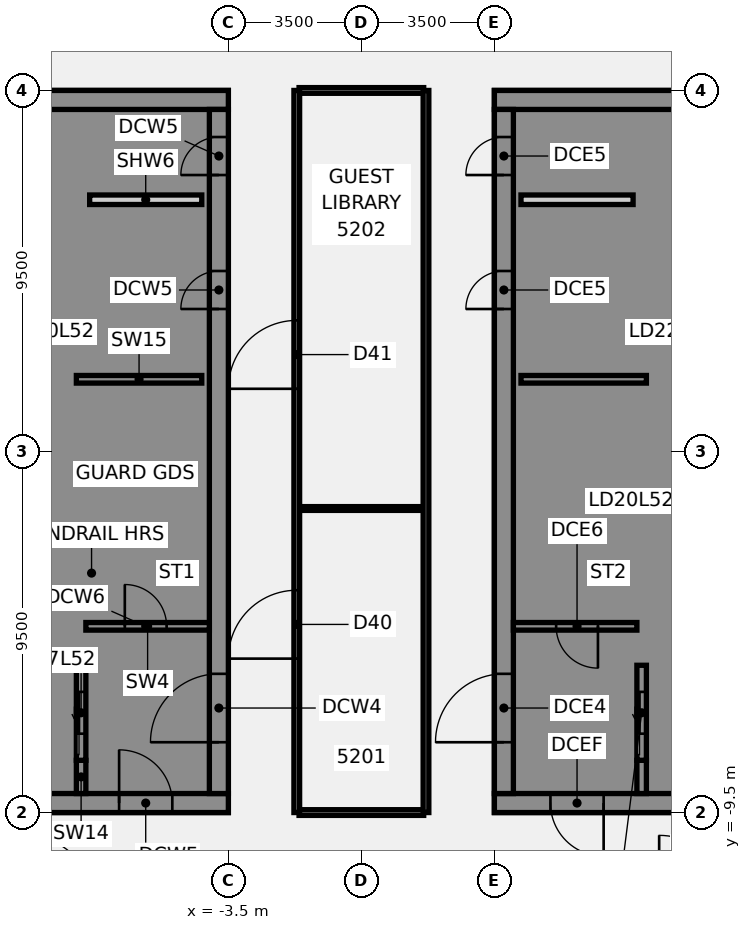
"""IFC4 building model, lengths in metres.
Left out: names, types, materials, properties, quantities, classifications, styles, units other than length and angle.
Written with IfcOpenShell. Run it as: python <this file> out.ifc"""

import sys

from ifc_helpers import new_model, si_unit, direction, frame, frame_2d, origin, place, context, subcontext, project, spatial, polyline, rectangle, outline, extrude, element, fill, save


model = new_model("IFC4")
c1 = context("Model", 3, precision=1e-05, world=origin(), true_north=direction((0.0, 1.0)))
c2 = subcontext(c1, "Body", "Model", "MODEL_VIEW")
j1 = project(units=[si_unit("LENGTHUNIT", "METRE"), si_unit("PLANEANGLEUNIT", "RADIAN")], contexts=[c1])
p1 = place(None, origin())
s1 = spatial("IfcSite", under=j1, at=p1, CompositionType="ELEMENT")
p2 = place(p1, origin())
s2 = spatial("IfcBuilding", under=s1, at=p2, CompositionType="ELEMENT")
p3 = place(p2, frame((0.0, 0.0, 207.7)))
s3 = spatial("IfcBuildingStorey", under=s2, at=p3, CompositionType="ELEMENT", Elevation=207.7)
p4 = place(p3, frame((-1.64, -9.5, 0.0), z_axis=(0.0, 0.0, 1.0), x_axis=(1.0, 0.0, 0.0)))
e1 = element("IfcWall", 1, at=p4, inside=s3, PredefinedType="PARTITIONING", context=c2, shape_type="SweptSolid", body=[
    extrude(rectangle(XDim=3.28, YDim=0.15, at=frame_2d((1.64, 0.0))), origin(), (0.0, 0.0, 1.0), 2.864),
])
p5 = place(p3, frame((-1.64, -1.5, 0.0), z_axis=(0.0, 0.0, 1.0), x_axis=(1.0, 0.0, 0.0)))
e2 = element("IfcWall", 2, at=p5, inside=s3, PredefinedType="PARTITIONING", context=c2, shape_type="SweptSolid", body=[
    extrude(rectangle(XDim=3.28, YDim=0.1, at=frame_2d((1.64, 0.0))), origin(), (0.0, 0.0, 1.0), 2.864),
])
p6 = place(p3, frame((-1.64, 9.5, 0.0), z_axis=(0.0, 0.0, 1.0), x_axis=(1.0, 0.0, 0.0)))
e3 = element("IfcWall", 3, at=p6, inside=s3, PredefinedType="PARTITIONING", context=c2, shape_type="SweptSolid", body=[
    extrude(rectangle(XDim=3.28, YDim=0.15, at=frame_2d((1.64, 0.0))), origin(), (0.0, 0.0, 1.0), 2.864),
])
p7 = place(p3, frame((-1.7, -9.5, 0.0), z_axis=(0.0, 0.0, 1.0), x_axis=(0.0, 1.0, 0.0)))
e4 = element("IfcWall", 4, at=p7, inside=s3, PredefinedType="PARTITIONING", context=c2, shape_type="SweptSolid", body=[
    extrude(rectangle(XDim=19.0, YDim=0.15, at=frame_2d((9.5, 0.0))), origin(), (0.0, 0.0, 1.0), 2.864),
])
p8 = place(p7, frame((4.05, 0.0, 0.0)))
e5 = element("IfcOpeningElement", 5, at=p8, cuts=e4, PredefinedType="OPENING", context=c2, shape_type="SweptSolid", body=[
    extrude(rectangle(XDim=1.8, YDim=2.1, at=frame_2d((0.9, 1.05))), frame((0.0, 0.085, 0.0), z_axis=(0.0, -1.0, 0.0), x_axis=(1.0, 0.0, 0.0)), (0.0, 0.0, 1.0), 0.17),
])
p9 = place(p7, frame((11.15, 0.0, 0.0)))
e6 = element("IfcOpeningElement", 6, at=p9, cuts=e4, PredefinedType="OPENING", context=c2, shape_type="SweptSolid", body=[
    extrude(rectangle(XDim=1.8, YDim=2.1, at=frame_2d((0.9, 1.05))), frame((0.0, 0.085, 0.0), z_axis=(0.0, -1.0, 0.0), x_axis=(1.0, 0.0, 0.0)), (0.0, 0.0, 1.0), 0.17),
])
p10 = place(p3, frame((1.7, -9.5, 0.0), z_axis=(0.0, 0.0, 1.0), x_axis=(0.0, 1.0, 0.0)))
e7 = element("IfcWall", 7, at=p10, inside=s3, PredefinedType="PARTITIONING", context=c2, shape_type="SweptSolid", body=[
    extrude(rectangle(XDim=19.0, YDim=0.15, at=frame_2d((9.5, 0.0))), origin(), (0.0, 0.0, 1.0), 2.864),
])
p11 = place(p3, frame((-16.5, -9.25, 0.0), z_axis=(0.0, 0.0, 1.0), x_axis=(1.0, 0.0, 0.0)))
e8 = element("IfcWall", 8, at=p11, inside=s3, PredefinedType="SHEAR", context=c2, shape_type="SweptSolid", body=[
    extrude(rectangle(XDim=13.0, YDim=0.5, at=frame_2d((6.5, 0.0))), origin(), (0.0, 0.0, 1.0), 3.46),
])
p12 = place(p11, frame((4.15, 0.0, 0.0)))
e9 = element("IfcOpeningElement", 9, at=p12, cuts=e8, PredefinedType="OPENING", context=c2, shape_type="SweptSolid", body=[
    extrude(rectangle(XDim=1.4, YDim=2.1, at=frame_2d((0.7, 1.05))), frame((0.0, 0.26, 0.0), z_axis=(0.0, -1.0, 0.0), x_axis=(1.0, 0.0, 0.0)), (0.0, 0.0, 1.0), 0.52),
])
p13 = place(p11, frame((10.125, 0.0, 0.0)))
e10 = element("IfcOpeningElement", 10, at=p13, cuts=e8, PredefinedType="OPENING", context=c2, shape_type="SweptSolid", body=[
    extrude(rectangle(XDim=1.4, YDim=2.1, at=frame_2d((0.7, 1.05))), frame((0.0, 0.26, 0.0), z_axis=(0.0, -1.0, 0.0), x_axis=(1.0, 0.0, 0.0)), (0.0, 0.0, 1.0), 0.52),
])
p14 = place(p3, frame((-16.5, 9.25, 0.0), z_axis=(0.0, 0.0, 1.0), x_axis=(1.0, 0.0, 0.0)))
e11 = element("IfcWall", 11, at=p14, inside=s3, PredefinedType="SHEAR", context=c2, shape_type="SweptSolid", body=[
    extrude(rectangle(XDim=13.0, YDim=0.5, at=frame_2d((6.5, 0.0))), origin(), (0.0, 0.0, 1.0), 3.46),
])
p15 = place(p3, origin())
e12 = element("IfcWall", 12, at=p15, inside=s3, PredefinedType="SHEAR", context=c2, shape_type="SweptSolid", body=[
    extrude(outline(polyline([(-9.8, -5.375), (-9.8, -5.625), (-7.5, -5.625), (-7.25, -5.625), (-7.25, 9.0), (-7.5, 9.0), (-9.8, 9.0), (-9.8, 8.125), (-7.5, 8.125), (-7.5, 5.625), (-9.8, 5.625), (-9.8, 5.375), (-7.5, 5.375), (-7.5, 2.875), (-9.8, 2.875), (-9.8, 2.625), (-7.5, 2.625), (-7.5, 0.125), (-9.8, 0.125), (-9.8, -0.125), (-7.5, -0.125), (-7.5, -2.625), (-9.8, -2.625), (-9.8, -2.875), (-7.5, -2.875), (-7.5, -5.375), (-9.8, -5.375)])), origin(), (0.0, 0.0, 1.0), 3.46),
])
p16 = place(p3, origin())
e13 = element("IfcWall", 13, at=p16, inside=s3, PredefinedType="SHEAR", context=c2, shape_type="SweptSolid", body=[
    extrude(outline(polyline([(-7.5, -8.125), (-9.55, -8.125), (-9.55, -5.625), (-9.8, -5.625), (-9.8, -8.125), (-9.8, -9.0), (-7.5, -9.0), (-7.5, -8.125)])), origin(), (0.0, 0.0, 1.0), 3.46),
])
p17 = place(p3, frame((-7.375, -9.0, 0.0), z_axis=(0.0, 0.0, 1.0), x_axis=(0.0, 1.0, 0.0)))
e14 = element("IfcWall", 14, at=p17, inside=s3, PredefinedType="SHEAR", context=c2, shape_type="SweptSolid", body=[
    extrude(rectangle(XDim=0.875, YDim=0.25, at=frame_2d((0.438, 0.0))), origin(), (0.0, 0.0, 1.0), 3.46),
])
p18 = place(p3, frame((-7.5, 1.9, 0.0), z_axis=(0.0, 0.0, 1.0), x_axis=(1.0, 0.0, 0.0)))
e15 = element("IfcWall", 15, at=p18, inside=s3, PredefinedType="SHEAR", context=c2, shape_type="SweptSolid", body=[
    extrude(rectangle(XDim=3.3, YDim=0.2, at=frame_2d((1.65, 0.0))), origin(), (0.0, 0.0, 1.0), 3.46),
])
p19 = place(p3, frame((-7.375, -8.125, 0.0), z_axis=(0.0, 0.0, 1.0), x_axis=(0.0, 1.0, 0.0)))
e16 = element("IfcWall", 16, at=p19, inside=s3, PredefinedType="SHEAR", context=c2, shape_type="SweptSolid", body=[
    extrude(rectangle(XDim=2.5, YDim=0.25, at=frame_2d((1.25, 0.0))), origin(), (0.0, 0.0, 1.0), 3.46),
])
p20 = place(p19, frame((0.7, 0.0, 0.0)))
e17 = element("IfcOpeningElement", 17, at=p20, cuts=e16, PredefinedType="OPENING", context=c2, shape_type="SweptSolid", body=[
    extrude(rectangle(XDim=1.1, YDim=2.1, at=frame_2d((0.55, 1.05))), frame((0.0, 0.135, 0.0), z_axis=(0.0, -1.0, 0.0), x_axis=(1.0, 0.0, 0.0)), (0.0, 0.0, 1.0), 0.27),
])
p21 = place(p3, frame((-3.75, -9.0, 0.0), z_axis=(0.0, 0.0, 1.0), x_axis=(0.0, 1.0, 0.0)))
e18 = element("IfcWall", 18, at=p21, inside=s3, PredefinedType="SHEAR", context=c2, shape_type="SweptSolid", body=[
    extrude(rectangle(XDim=18.0, YDim=0.5, at=frame_2d((9.0, 0.0))), origin(), (0.0, 0.0, 1.0), 3.46),
])
p22 = place(p21, frame((1.35, 0.0, 0.0)))
e19 = element("IfcOpeningElement", 19, at=p22, cuts=e18, PredefinedType="OPENING", context=c2, shape_type="SweptSolid", body=[
    extrude(rectangle(XDim=1.8, YDim=2.1, at=frame_2d((0.9, 1.05))), frame((0.0, 0.26, 0.0), z_axis=(0.0, -1.0, 0.0), x_axis=(1.0, 0.0, 0.0)), (0.0, 0.0, 1.0), 0.52),
])
p23 = place(p21, frame((12.75, 0.0, 0.0)))
e20 = element("IfcOpeningElement", 20, at=p23, cuts=e18, PredefinedType="OPENING", context=c2, shape_type="SweptSolid", body=[
    extrude(rectangle(XDim=1.0, YDim=2.1, at=frame_2d((0.5, 1.05))), frame((0.0, 0.26, 0.0), z_axis=(0.0, -1.0, 0.0), x_axis=(1.0, 0.0, 0.0)), (0.0, 0.0, 1.0), 0.52),
])
p24 = place(p21, frame((16.274, 0.0, 0.0)))
e21 = element("IfcOpeningElement", 21, at=p24, cuts=e18, PredefinedType="OPENING", context=c2, shape_type="SweptSolid", body=[
    extrude(rectangle(XDim=1.0, YDim=2.1, at=frame_2d((0.5, 1.05))), frame((0.0, 0.26, 0.0), z_axis=(0.0, -1.0, 0.0), x_axis=(1.0, 0.0, 0.0)), (0.0, 0.0, 1.0), 0.52),
])
p25 = place(p3, frame((-7.15, 6.624, 0.0), z_axis=(0.0, 0.0, 1.0), x_axis=(1.0, 0.0, 0.0)))
e22 = element("IfcWall", 22, at=p25, inside=s3, PredefinedType="PARTITIONING", context=c2, shape_type="SweptSolid", body=[
    extrude(rectangle(XDim=2.95, YDim=0.25, at=frame_2d((1.475, 0.0))), origin(), (0.0, 0.0, 1.0), 3.46),
])
p26 = place(p3, frame((-7.25, -4.6, 0.0), z_axis=(0.0, 0.0, 1.0), x_axis=(1.0, 0.0, 0.0)))
e23 = element("IfcWall", 23, at=p26, inside=s3, PredefinedType="SHEAR", context=c2, shape_type="SweptSolid", body=[
    extrude(rectangle(XDim=3.25, YDim=0.2, at=frame_2d((1.625, 0.0))), origin(), (0.0, 0.0, 1.0), 3.46),
])
p27 = place(p26, frame((1.025, 0.0, 0.0)))
e24 = element("IfcOpeningElement", 24, at=p27, cuts=e23, PredefinedType="OPENING", context=c2, shape_type="SweptSolid", body=[
    extrude(rectangle(XDim=1.1, YDim=2.1, at=frame_2d((0.55, 1.05))), frame((0.0, 0.11, 0.0), z_axis=(0.0, -1.0, 0.0), x_axis=(1.0, 0.0, 0.0)), (0.0, 0.0, 1.0), 0.22),
])
p28 = place(p3, frame((16.5, -9.25, 0.0), z_axis=(0.0, 0.0, 1.0), x_axis=(-1.0, 0.0, 0.0)))
e25 = element("IfcWall", 25, at=p28, inside=s3, PredefinedType="SHEAR", context=c2, shape_type="SweptSolid", body=[
    extrude(rectangle(XDim=13.0, YDim=0.5, at=frame_2d((6.5, 0.0))), origin(), (0.0, 0.0, 1.0), 3.46),
])
p29 = place(p28, frame((4.15, 0.0, 0.0)))
e26 = element("IfcOpeningElement", 26, at=p29, cuts=e25, PredefinedType="OPENING", context=c2, shape_type="SweptSolid", body=[
    extrude(rectangle(XDim=1.4, YDim=2.1, at=frame_2d((0.7, 1.05))), frame((0.0, 0.26, 0.0), z_axis=(0.0, -1.0, 0.0), x_axis=(1.0, 0.0, 0.0)), (0.0, 0.0, 1.0), 0.52),
])
p30 = place(p28, frame((10.125, 0.0, 0.0)))
e27 = element("IfcOpeningElement", 27, at=p30, cuts=e25, PredefinedType="OPENING", context=c2, shape_type="SweptSolid", body=[
    extrude(rectangle(XDim=1.4, YDim=2.1, at=frame_2d((0.7, 1.05))), frame((0.0, 0.26, 0.0), z_axis=(0.0, -1.0, 0.0), x_axis=(1.0, 0.0, 0.0)), (0.0, 0.0, 1.0), 0.52),
])
p31 = place(p3, frame((16.5, 9.25, 0.0), z_axis=(0.0, 0.0, 1.0), x_axis=(-1.0, 0.0, 0.0)))
e28 = element("IfcWall", 28, at=p31, inside=s3, PredefinedType="SHEAR", context=c2, shape_type="SweptSolid", body=[
    extrude(rectangle(XDim=13.0, YDim=0.5, at=frame_2d((6.5, 0.0))), origin(), (0.0, 0.0, 1.0), 3.46),
])
p32 = place(p3, origin())
e29 = element("IfcWall", 29, at=p32, inside=s3, PredefinedType="SHEAR", context=c2, shape_type="SweptSolid", body=[
    extrude(outline(polyline([(9.8, -5.375), (7.5, -5.375), (7.5, -2.875), (9.8, -2.875), (9.8, -2.625), (7.5, -2.625), (7.5, -0.125), (9.8, -0.125), (9.8, 0.125), (7.5, 0.125), (7.5, 2.625), (9.8, 2.625), (9.8, 2.875), (7.5, 2.875), (7.5, 5.375), (9.8, 5.375), (9.8, 5.625), (7.5, 5.625), (7.5, 8.125), (9.8, 8.125), (9.8, 9.0), (7.5, 9.0), (7.25, 9.0), (7.25, -5.625), (7.5, -5.625), (9.8, -5.625), (9.8, -5.375)])), origin(), (0.0, 0.0, 1.0), 3.46),
])
p33 = place(p3, origin())
e30 = element("IfcWall", 30, at=p33, inside=s3, PredefinedType="SHEAR", context=c2, shape_type="SweptSolid", body=[
    extrude(outline(polyline([(7.5, -8.125), (7.5, -9.0), (9.8, -9.0), (9.8, -8.125), (9.8, -5.625), (9.55, -5.625), (9.55, -8.125), (7.5, -8.125)])), origin(), (0.0, 0.0, 1.0), 3.46),
])
p34 = place(p3, frame((7.375, -9.0, 0.0), z_axis=(0.0, 0.0, 1.0), x_axis=(0.0, 1.0, 0.0)))
e31 = element("IfcWall", 31, at=p34, inside=s3, PredefinedType="SHEAR", context=c2, shape_type="SweptSolid", body=[
    extrude(rectangle(XDim=0.875, YDim=0.25, at=frame_2d((0.438, 0.0))), origin(), (0.0, 0.0, 1.0), 3.46),
])
p35 = place(p3, frame((7.5, 1.9, 0.0), z_axis=(0.0, 0.0, 1.0), x_axis=(-1.0, 0.0, 0.0)))
e32 = element("IfcWall", 32, at=p35, inside=s3, PredefinedType="SHEAR", context=c2, shape_type="SweptSolid", body=[
    extrude(rectangle(XDim=3.3, YDim=0.2, at=frame_2d((1.65, 0.0))), origin(), (0.0, 0.0, 1.0), 3.46),
])
p36 = place(p3, frame((7.375, -8.125, 0.0), z_axis=(0.0, 0.0, 1.0), x_axis=(0.0, 1.0, 0.0)))
e33 = element("IfcWall", 33, at=p36, inside=s3, PredefinedType="SHEAR", context=c2, shape_type="SweptSolid", body=[
    extrude(rectangle(XDim=2.5, YDim=0.25, at=frame_2d((1.25, 0.0))), origin(), (0.0, 0.0, 1.0), 3.46),
])
p37 = place(p36, frame((0.7, 0.0, 0.0)))
e34 = element("IfcOpeningElement", 34, at=p37, cuts=e33, PredefinedType="OPENING", context=c2, shape_type="SweptSolid", body=[
    extrude(rectangle(XDim=1.1, YDim=2.1, at=frame_2d((0.55, 1.05))), frame((0.0, 0.135, 0.0), z_axis=(0.0, -1.0, 0.0), x_axis=(1.0, 0.0, 0.0)), (0.0, 0.0, 1.0), 0.27),
])
p38 = place(p3, frame((3.75, -9.0, 0.0), z_axis=(0.0, 0.0, 1.0), x_axis=(0.0, 1.0, 0.0)))
e35 = element("IfcWall", 35, at=p38, inside=s3, PredefinedType="SHEAR", context=c2, shape_type="SweptSolid", body=[
    extrude(rectangle(XDim=18.0, YDim=0.5, at=frame_2d((9.0, 0.0))), origin(), (0.0, 0.0, 1.0), 3.46),
])
p39 = place(p38, frame((1.35, 0.0, 0.0)))
e36 = element("IfcOpeningElement", 36, at=p39, cuts=e35, PredefinedType="OPENING", context=c2, shape_type="SweptSolid", body=[
    extrude(rectangle(XDim=1.8, YDim=2.1, at=frame_2d((0.9, 1.05))), frame((0.0, 0.26, 0.0), z_axis=(0.0, -1.0, 0.0), x_axis=(1.0, 0.0, 0.0)), (0.0, 0.0, 1.0), 0.52),
])
p40 = place(p38, frame((12.75, 0.0, 0.0)))
e37 = element("IfcOpeningElement", 37, at=p40, cuts=e35, PredefinedType="OPENING", context=c2, shape_type="SweptSolid", body=[
    extrude(rectangle(XDim=1.0, YDim=2.1, at=frame_2d((0.5, 1.05))), frame((0.0, 0.26, 0.0), z_axis=(0.0, -1.0, 0.0), x_axis=(1.0, 0.0, 0.0)), (0.0, 0.0, 1.0), 0.52),
])
p41 = place(p38, frame((16.274, 0.0, 0.0)))
e38 = element("IfcOpeningElement", 38, at=p41, cuts=e35, PredefinedType="OPENING", context=c2, shape_type="SweptSolid", body=[
    extrude(rectangle(XDim=1.0, YDim=2.1, at=frame_2d((0.5, 1.05))), frame((0.0, 0.26, 0.0), z_axis=(0.0, -1.0, 0.0), x_axis=(1.0, 0.0, 0.0)), (0.0, 0.0, 1.0), 0.52),
])
p42 = place(p3, frame((7.15, 6.624, 0.0), z_axis=(0.0, 0.0, 1.0), x_axis=(-1.0, 0.0, 0.0)))
e39 = element("IfcWall", 39, at=p42, inside=s3, PredefinedType="PARTITIONING", context=c2, shape_type="SweptSolid", body=[
    extrude(rectangle(XDim=2.95, YDim=0.25, at=frame_2d((1.475, 0.0))), origin(), (0.0, 0.0, 1.0), 3.46),
])
p43 = place(p3, frame((7.25, -4.6, 0.0), z_axis=(0.0, 0.0, 1.0), x_axis=(-1.0, 0.0, 0.0)))
e40 = element("IfcWall", 40, at=p43, inside=s3, PredefinedType="SHEAR", context=c2, shape_type="SweptSolid", body=[
    extrude(rectangle(XDim=3.25, YDim=0.2, at=frame_2d((1.625, 0.0))), origin(), (0.0, 0.0, 1.0), 3.46),
])
p44 = place(p43, frame((1.025, 0.0, 0.0)))
e41 = element("IfcOpeningElement", 41, at=p44, cuts=e40, PredefinedType="OPENING", context=c2, shape_type="SweptSolid", body=[
    extrude(rectangle(XDim=1.1, YDim=2.1, at=frame_2d((0.55, 1.05))), frame((0.0, 0.11, 0.0), z_axis=(0.0, -1.0, 0.0), x_axis=(1.0, 0.0, 0.0)), (0.0, 0.0, 1.0), 0.22),
])
p45 = place(p8, frame((1.8, 0.0, 0.0), z_axis=(0.0, 0.0, 1.0), x_axis=(-1.0, 0.0, 0.0)))
e42 = element("IfcDoor", 42, at=p45, inside=s3, OperationType="DOUBLE_DOOR_SINGLE_SWING", PredefinedType="DOOR", context=c2, shape_type="SweptSolid", body=[
    extrude(rectangle(XDim=1.8, YDim=2.1, at=frame_2d((0.9, 1.05))), frame((0.0, 0.025, 0.0), z_axis=(0.0, -1.0, 0.0), x_axis=(1.0, 0.0, 0.0)), (0.0, 0.0, 1.0), 0.05),
])
fill(e5, e42)
p46 = place(p9, frame((1.8, 0.0, 0.0), z_axis=(0.0, 0.0, 1.0), x_axis=(-1.0, 0.0, 0.0)))
e43 = element("IfcDoor", 43, at=p46, inside=s3, OperationType="DOUBLE_DOOR_SINGLE_SWING", PredefinedType="DOOR", context=c2, shape_type="SweptSolid", body=[
    extrude(rectangle(XDim=1.8, YDim=2.1, at=frame_2d((0.9, 1.05))), frame((0.0, 0.025, 0.0), z_axis=(0.0, -1.0, 0.0), x_axis=(1.0, 0.0, 0.0)), (0.0, 0.0, 1.0), 0.05),
])
fill(e6, e43)
p47 = place(p13, origin())
e44 = element("IfcDoor", 44, at=p47, inside=s3, OperationType="SINGLE_SWING_LEFT", PredefinedType="DOOR", context=c2, shape_type="SweptSolid", body=[
    extrude(rectangle(XDim=1.4, YDim=2.1, at=frame_2d((0.7, 1.05))), frame((0.0, 0.025, 0.0), z_axis=(0.0, -1.0, 0.0), x_axis=(1.0, 0.0, 0.0)), (0.0, 0.0, 1.0), 0.05),
])
fill(e10, e44)
p48 = place(p22, origin())
e45 = element("IfcDoor", 45, at=p48, inside=s3, OperationType="SINGLE_SWING_LEFT", PredefinedType="DOOR", context=c2, shape_type="SweptSolid", body=[
    extrude(rectangle(XDim=1.8, YDim=2.1, at=frame_2d((0.9, 1.05))), frame((0.0, 0.025, 0.0), z_axis=(0.0, -1.0, 0.0), x_axis=(1.0, 0.0, 0.0)), (0.0, 0.0, 1.0), 0.05),
])
fill(e19, e45)
p49 = place(p23, origin())
e46 = element("IfcDoor", 46, at=p49, inside=s3, OperationType="SINGLE_SWING_LEFT", PredefinedType="DOOR", context=c2, shape_type="SweptSolid", body=[
    extrude(rectangle(XDim=1.0, YDim=2.1, at=frame_2d((0.5, 1.05))), frame((0.0, 0.225, 0.0), z_axis=(0.0, -1.0, 0.0), x_axis=(1.0, 0.0, 0.0)), (0.0, 0.0, 1.0), 0.05),
])
fill(e20, e46)
p50 = place(p24, origin())
e47 = element("IfcDoor", 47, at=p50, inside=s3, OperationType="SINGLE_SWING_LEFT", PredefinedType="DOOR", context=c2, shape_type="SweptSolid", body=[
    extrude(rectangle(XDim=1.0, YDim=2.1, at=frame_2d((0.5, 1.05))), frame((0.0, 0.225, 0.0), z_axis=(0.0, -1.0, 0.0), x_axis=(1.0, 0.0, 0.0)), (0.0, 0.0, 1.0), 0.05),
])
fill(e21, e47)
p51 = place(p27, origin())
e48 = element("IfcDoor", 48, at=p51, inside=s3, OperationType="SINGLE_SWING_LEFT", PredefinedType="DOOR", context=c2, shape_type="SweptSolid", body=[
    extrude(rectangle(XDim=1.1, YDim=2.1, at=frame_2d((0.55, 1.05))), frame((0.0, 0.025, 0.0), z_axis=(0.0, -1.0, 0.0), x_axis=(1.0, 0.0, 0.0)), (0.0, 0.0, 1.0), 0.05),
])
fill(e24, e48)
p52 = place(p20, origin())
e49 = element("IfcDoor", 49, at=p52, inside=s3, OperationType="SLIDING_TO_LEFT", PredefinedType="DOOR", context=c2, shape_type="SweptSolid", body=[
    extrude(rectangle(XDim=1.1, YDim=2.1, at=frame_2d((0.55, 1.05))), frame((0.0, 0.025, 0.0), z_axis=(0.0, -1.0, 0.0), x_axis=(1.0, 0.0, 0.0)), (0.0, 0.0, 1.0), 0.05),
])
fill(e17, e49)
p53 = place(p30, origin())
e50 = element("IfcDoor", 50, at=p53, inside=s3, OperationType="SINGLE_SWING_LEFT", PredefinedType="DOOR", context=c2, shape_type="SweptSolid", body=[
    extrude(rectangle(XDim=1.4, YDim=2.1, at=frame_2d((0.7, 1.05))), frame((0.0, 0.025, 0.0), z_axis=(0.0, -1.0, 0.0), x_axis=(1.0, 0.0, 0.0)), (0.0, 0.0, 1.0), 0.05),
])
fill(e27, e50)
p54 = place(p39, origin())
e51 = element("IfcDoor", 51, at=p54, inside=s3, OperationType="SINGLE_SWING_LEFT", PredefinedType="DOOR", context=c2, shape_type="SweptSolid", body=[
    extrude(rectangle(XDim=1.8, YDim=2.1, at=frame_2d((0.9, 1.05))), frame((0.0, 0.025, 0.0), z_axis=(0.0, -1.0, 0.0), x_axis=(1.0, 0.0, 0.0)), (0.0, 0.0, 1.0), 0.05),
])
fill(e36, e51)
p55 = place(p40, origin())
e52 = element("IfcDoor", 52, at=p55, inside=s3, OperationType="SINGLE_SWING_LEFT", PredefinedType="DOOR", context=c2, shape_type="SweptSolid", body=[
    extrude(rectangle(XDim=1.0, YDim=2.1, at=frame_2d((0.5, 1.05))), frame((0.0, -0.175, 0.0), z_axis=(0.0, -1.0, 0.0), x_axis=(1.0, 0.0, 0.0)), (0.0, 0.0, 1.0), 0.05),
])
fill(e37, e52)
p56 = place(p41, origin())
e53 = element("IfcDoor", 53, at=p56, inside=s3, OperationType="SINGLE_SWING_LEFT", PredefinedType="DOOR", context=c2, shape_type="SweptSolid", body=[
    extrude(rectangle(XDim=1.0, YDim=2.1, at=frame_2d((0.5, 1.05))), frame((0.0, -0.175, 0.0), z_axis=(0.0, -1.0, 0.0), x_axis=(1.0, 0.0, 0.0)), (0.0, 0.0, 1.0), 0.05),
])
fill(e38, e53)
p57 = place(p44, origin())
e54 = element("IfcDoor", 54, at=p57, inside=s3, OperationType="SINGLE_SWING_LEFT", PredefinedType="DOOR", context=c2, shape_type="SweptSolid", body=[
    extrude(rectangle(XDim=1.1, YDim=2.1, at=frame_2d((0.55, 1.05))), frame((0.0, 0.025, 0.0), z_axis=(0.0, -1.0, 0.0), x_axis=(1.0, 0.0, 0.0)), (0.0, 0.0, 1.0), 0.05),
])
fill(e41, e54)
p58 = place(p37, origin())
e55 = element("IfcDoor", 55, at=p58, inside=s3, OperationType="SLIDING_TO_LEFT", PredefinedType="DOOR", context=c2, shape_type="SweptSolid", body=[
    extrude(rectangle(XDim=1.1, YDim=2.1, at=frame_2d((0.55, 1.05))), frame((0.0, 0.025, 0.0), z_axis=(0.0, -1.0, 0.0), x_axis=(1.0, 0.0, 0.0)), (0.0, 0.0, 1.0), 0.05),
])
fill(e34, e55)
save(model, sys.argv[1])
